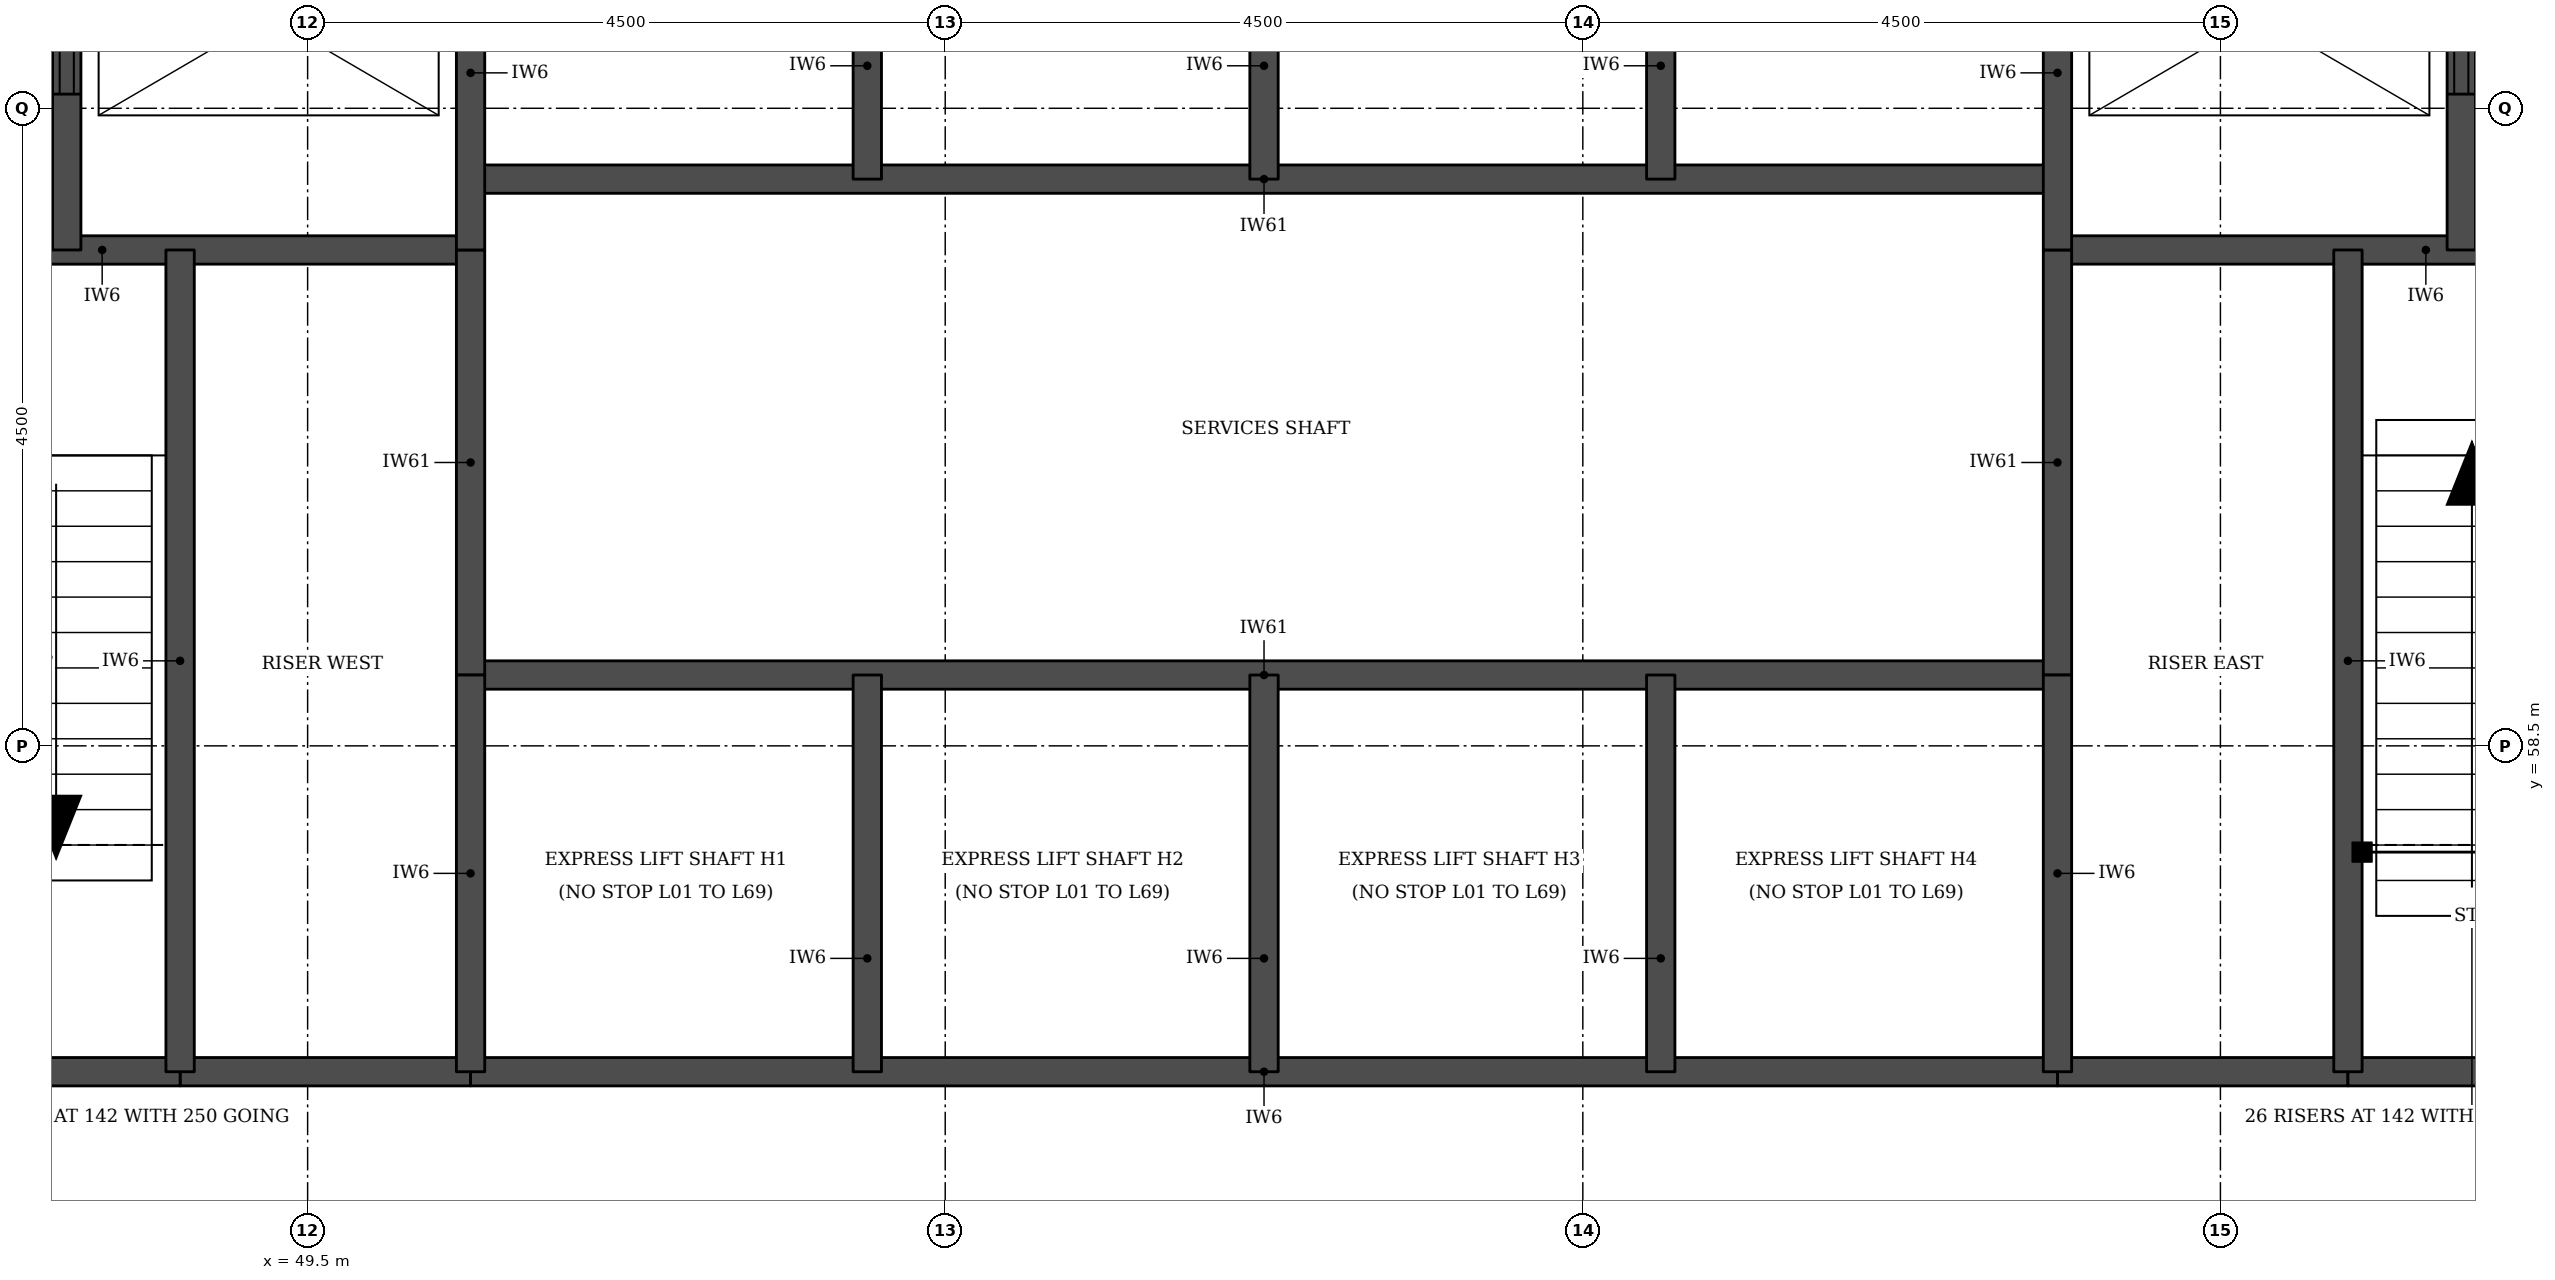
"""IFC4 building model, lengths in metres.
Left out: names, types, materials, properties, quantities, classifications, styles, units other than length and angle.
Written with IfcOpenShell. Run it as: python <this file> out.ifc"""

import sys

from ifc_helpers import new_model, si_unit, direction, frame, frame_2d, origin, place, context, subcontext, project, spatial, rectangle, extrude, element, fill, save


model = new_model("IFC4")
c1 = context("Model", 3, precision=1e-05, world=origin(), true_north=direction((0.0, 1.0)))
c2 = subcontext(c1, "Body", "Model", "MODEL_VIEW")
j1 = project(units=[si_unit("LENGTHUNIT", "METRE"), si_unit("PLANEANGLEUNIT", "RADIAN")], contexts=[c1])
p1 = place(None, origin())
s1 = spatial("IfcSite", under=j1, at=p1, CompositionType="ELEMENT")
p2 = place(p1, origin())
s2 = spatial("IfcBuilding", under=s1, at=p2, CompositionType="ELEMENT")
p3 = place(p2, frame((0.0, 0.0, 93.7)))
s3 = spatial("IfcBuildingStorey", under=s2, at=p3, CompositionType="ELEMENT", Elevation=93.7)
for number, where, z_axis, x_axis in (
    (1, (48.6, 56.2, 0.0), (0.0, 0.0, 1.0), (1.0, 0.0, 0.0)),
    (2, (61.85, 56.2, 0.0), (0.0, 0.0, 1.0), (1.0, 0.0, 0.0)),
):
    element("IfcWall", number, at=place(p3, frame(where, z_axis=z_axis, x_axis=x_axis)), inside=s3, PredefinedType="SOLIDWALL", context=c2, shape_type="SweptSolid", body=[
        extrude(rectangle(XDim=2.05, YDim=0.2, at=frame_2d((1.025, 0.0))), origin(), (0.0, 0.0, 1.0), 3.55),
    ])
p4 = place(p3, frame((45.45, 56.2, 0.0), z_axis=(0.0, 0.0, 1.0), x_axis=(1.0, 0.0, 0.0)))
e3 = element("IfcWall", 3, at=p4, inside=s3, PredefinedType="SOLIDWALL", context=c2, shape_type="SweptSolid", body=[
    extrude(rectangle(XDim=3.15, YDim=0.2, at=frame_2d((1.575, 0.0))), origin(), (0.0, 0.0, 1.0), 3.55),
])
p5 = place(p3, frame((50.65, 56.2, 0.0), z_axis=(0.0, 0.0, 1.0), x_axis=(1.0, 0.0, 0.0)))
e4 = element("IfcWall", 4, at=p5, inside=s3, PredefinedType="SOLIDWALL", context=c2, shape_type="SweptSolid", body=[
    extrude(rectangle(XDim=11.2, YDim=0.2, at=frame_2d((5.6, 0.0))), origin(), (0.0, 0.0, 1.0), 3.55),
])
p6 = place(p3, frame((63.9, 56.2, 0.0), z_axis=(0.0, 0.0, 1.0), x_axis=(1.0, 0.0, 0.0)))
e5 = element("IfcWall", 5, at=p6, inside=s3, PredefinedType="SOLIDWALL", context=c2, shape_type="SweptSolid", body=[
    extrude(rectangle(XDim=3.15, YDim=0.2, at=frame_2d((1.575, 0.0))), origin(), (0.0, 0.0, 1.0), 3.55),
])
p7 = place(p3, frame((50.65, 59.0, 0.0), z_axis=(0.0, 0.0, 1.0), x_axis=(1.0, 0.0, 0.0)))
e6 = element("IfcWall", 6, at=p7, inside=s3, PredefinedType="SOLIDWALL", context=c2, shape_type="SweptSolid", body=[
    extrude(rectangle(XDim=11.2, YDim=0.2, at=frame_2d((5.6, 0.0))), origin(), (0.0, 0.0, 1.0), 3.7),
])
for number, where, z_axis, x_axis in (
    (7, (45.45, 62.0, 0.0), (0.0, 0.0, 1.0), (1.0, 0.0, 0.0)),
    (8, (61.85, 62.0, 0.0), (0.0, 0.0, 1.0), (1.0, 0.0, 0.0)),
):
    element("IfcWall", number, at=place(p3, frame(where, z_axis=z_axis, x_axis=x_axis)), inside=s3, PredefinedType="SOLIDWALL", context=c2, shape_type="SweptSolid", body=[
        extrude(rectangle(XDim=5.2, YDim=0.2, at=frame_2d((2.6, 0.0))), origin(), (0.0, 0.0, 1.0), 3.55),
    ])
p8 = place(p3, frame((50.65, 62.5, 0.0), z_axis=(0.0, 0.0, 1.0), x_axis=(1.0, 0.0, 0.0)))
e9 = element("IfcWall", 9, at=p8, inside=s3, PredefinedType="SOLIDWALL", context=c2, shape_type="SweptSolid", body=[
    extrude(rectangle(XDim=11.2, YDim=0.2, at=frame_2d((5.6, 0.0))), origin(), (0.0, 0.0, 1.0), 3.7),
])
p9 = place(p3, frame((47.8, 62.0, 0.0), z_axis=(0.0, 0.0, 1.0), x_axis=(0.0, 1.0, 0.0)))
e10 = element("IfcWall", 10, at=p9, inside=s3, PredefinedType="SOLIDWALL", context=c2, shape_type="SweptSolid", body=[
    extrude(rectangle(XDim=3.3, YDim=0.2, at=frame_2d((1.65, 0.0))), origin(), (0.0, 0.0, 1.0), 3.55),
])
p10 = place(p9, frame((1.1, 0.0, 0.0)))
e11 = element("IfcOpeningElement", 11, at=p10, cuts=e10, PredefinedType="OPENING", context=c2, shape_type="SweptSolid", body=[
    extrude(rectangle(XDim=1.1, YDim=2.1, at=frame_2d((0.55, 1.05))), frame((0.0, 0.11, 0.0), z_axis=(0.0, -1.0, 0.0), x_axis=(1.0, 0.0, 0.0)), (0.0, 0.0, 1.0), 0.22),
])
p11 = place(p3, frame((48.6, 56.2, 0.0), z_axis=(0.0, 0.0, 1.0), x_axis=(0.0, 1.0, 0.0)))
e12 = element("IfcWall", 12, at=p11, inside=s3, PredefinedType="SOLIDWALL", context=c2, shape_type="SweptSolid", body=[
    extrude(rectangle(XDim=5.8, YDim=0.2, at=frame_2d((2.9, 0.0))), origin(), (0.0, 0.0, 1.0), 3.55),
])
p12 = place(p3, frame((50.65, 59.0, 0.0), z_axis=(0.0, 0.0, 1.0), x_axis=(0.0, 1.0, 0.0)))
e13 = element("IfcWall", 13, at=p12, inside=s3, PredefinedType="SOLIDWALL", context=c2, shape_type="SweptSolid", body=[
    extrude(rectangle(XDim=3.0, YDim=0.2, at=frame_2d((1.5, 0.0))), origin(), (0.0, 0.0, 1.0), 3.7),
])
p13 = place(p3, frame((50.65, 56.2, 0.0), z_axis=(0.0, 0.0, 1.0), x_axis=(0.0, 1.0, 0.0)))
e14 = element("IfcWall", 14, at=p13, inside=s3, PredefinedType="SOLIDWALL", context=c2, shape_type="SweptSolid", body=[
    extrude(rectangle(XDim=2.8, YDim=0.2, at=frame_2d((1.4, 0.0))), origin(), (0.0, 0.0, 1.0), 3.55),
])
p14 = place(p3, frame((50.65, 62.0, 0.0), z_axis=(0.0, 0.0, 1.0), x_axis=(0.0, 1.0, 0.0)))
e15 = element("IfcWall", 15, at=p14, inside=s3, PredefinedType="SOLIDWALL", context=c2, shape_type="SweptSolid", body=[
    extrude(rectangle(XDim=3.3, YDim=0.2, at=frame_2d((1.65, 0.0))), origin(), (0.0, 0.0, 1.0), 3.55),
])
for number, where, z_axis, x_axis in (
    (16, (53.45, 56.2, 0.0), (0.0, 0.0, 1.0), (0.0, 1.0, 0.0)),
    (17, (53.45, 62.5, 0.0), (0.0, 0.0, 1.0), (0.0, 1.0, 0.0)),
    (18, (56.25, 56.2, 0.0), (0.0, 0.0, 1.0), (0.0, 1.0, 0.0)),
    (19, (56.25, 62.5, 0.0), (0.0, 0.0, 1.0), (0.0, 1.0, 0.0)),
    (20, (59.05, 56.2, 0.0), (0.0, 0.0, 1.0), (0.0, 1.0, 0.0)),
    (21, (59.05, 62.5, 0.0), (0.0, 0.0, 1.0), (0.0, 1.0, 0.0)),
):
    element("IfcWall", number, at=place(p3, frame(where, z_axis=z_axis, x_axis=x_axis)), inside=s3, PredefinedType="SOLIDWALL", context=c2, shape_type="SweptSolid", body=[
        extrude(rectangle(XDim=2.8, YDim=0.2, at=frame_2d((1.4, 0.0))), origin(), (0.0, 0.0, 1.0), 3.55),
    ])
p15 = place(p3, frame((61.85, 59.0, 0.0), z_axis=(0.0, 0.0, 1.0), x_axis=(0.0, 1.0, 0.0)))
e22 = element("IfcWall", 22, at=p15, inside=s3, PredefinedType="SOLIDWALL", context=c2, shape_type="SweptSolid", body=[
    extrude(rectangle(XDim=3.0, YDim=0.2, at=frame_2d((1.5, 0.0))), origin(), (0.0, 0.0, 1.0), 3.7),
])
p16 = place(p3, frame((61.85, 56.2, 0.0), z_axis=(0.0, 0.0, 1.0), x_axis=(0.0, 1.0, 0.0)))
e23 = element("IfcWall", 23, at=p16, inside=s3, PredefinedType="SOLIDWALL", context=c2, shape_type="SweptSolid", body=[
    extrude(rectangle(XDim=2.8, YDim=0.2, at=frame_2d((1.4, 0.0))), origin(), (0.0, 0.0, 1.0), 3.55),
])
p17 = place(p3, frame((61.85, 62.0, 0.0), z_axis=(0.0, 0.0, 1.0), x_axis=(0.0, 1.0, 0.0)))
e24 = element("IfcWall", 24, at=p17, inside=s3, PredefinedType="SOLIDWALL", context=c2, shape_type="SweptSolid", body=[
    extrude(rectangle(XDim=3.3, YDim=0.2, at=frame_2d((1.65, 0.0))), origin(), (0.0, 0.0, 1.0), 3.55),
])
p18 = place(p3, frame((63.9, 56.2, 0.0), z_axis=(0.0, 0.0, 1.0), x_axis=(0.0, 1.0, 0.0)))
e25 = element("IfcWall", 25, at=p18, inside=s3, PredefinedType="SOLIDWALL", context=c2, shape_type="SweptSolid", body=[
    extrude(rectangle(XDim=5.8, YDim=0.2, at=frame_2d((2.9, 0.0))), origin(), (0.0, 0.0, 1.0), 3.55),
])
p19 = place(p3, frame((64.7, 62.0, 0.0), z_axis=(0.0, 0.0, 1.0), x_axis=(0.0, 1.0, 0.0)))
e26 = element("IfcWall", 26, at=p19, inside=s3, PredefinedType="SOLIDWALL", context=c2, shape_type="SweptSolid", body=[
    extrude(rectangle(XDim=3.3, YDim=0.2, at=frame_2d((1.65, 0.0))), origin(), (0.0, 0.0, 1.0), 3.55),
])
p20 = place(p19, frame((1.1, 0.0, 0.0)))
e27 = element("IfcOpeningElement", 27, at=p20, cuts=e26, PredefinedType="OPENING", context=c2, shape_type="SweptSolid", body=[
    extrude(rectangle(XDim=1.1, YDim=2.1, at=frame_2d((0.55, 1.05))), frame((0.0, 0.11, 0.0), z_axis=(0.0, -1.0, 0.0), x_axis=(1.0, 0.0, 0.0)), (0.0, 0.0, 1.0), 0.22),
])
p21 = place(p10, origin())
e28 = element("IfcDoor", 28, at=p21, inside=s3, OperationType="DOUBLE_DOOR_SLIDING", PredefinedType="DOOR", context=c2, shape_type="SweptSolid", body=[
    extrude(rectangle(XDim=1.1, YDim=2.1, at=frame_2d((0.55, 1.05))), frame((0.0, 0.025, 0.0), z_axis=(0.0, -1.0, 0.0), x_axis=(1.0, 0.0, 0.0)), (0.0, 0.0, 1.0), 0.05),
])
fill(e11, e28)
p22 = place(p20, origin())
e29 = element("IfcDoor", 29, at=p22, inside=s3, OperationType="DOUBLE_DOOR_SLIDING", PredefinedType="DOOR", context=c2, shape_type="SweptSolid", body=[
    extrude(rectangle(XDim=1.1, YDim=2.1, at=frame_2d((0.55, 1.05))), frame((0.0, 0.025, 0.0), z_axis=(0.0, -1.0, 0.0), x_axis=(1.0, 0.0, 0.0)), (0.0, 0.0, 1.0), 0.05),
])
fill(e27, e29)
save(model, sys.argv[1])
